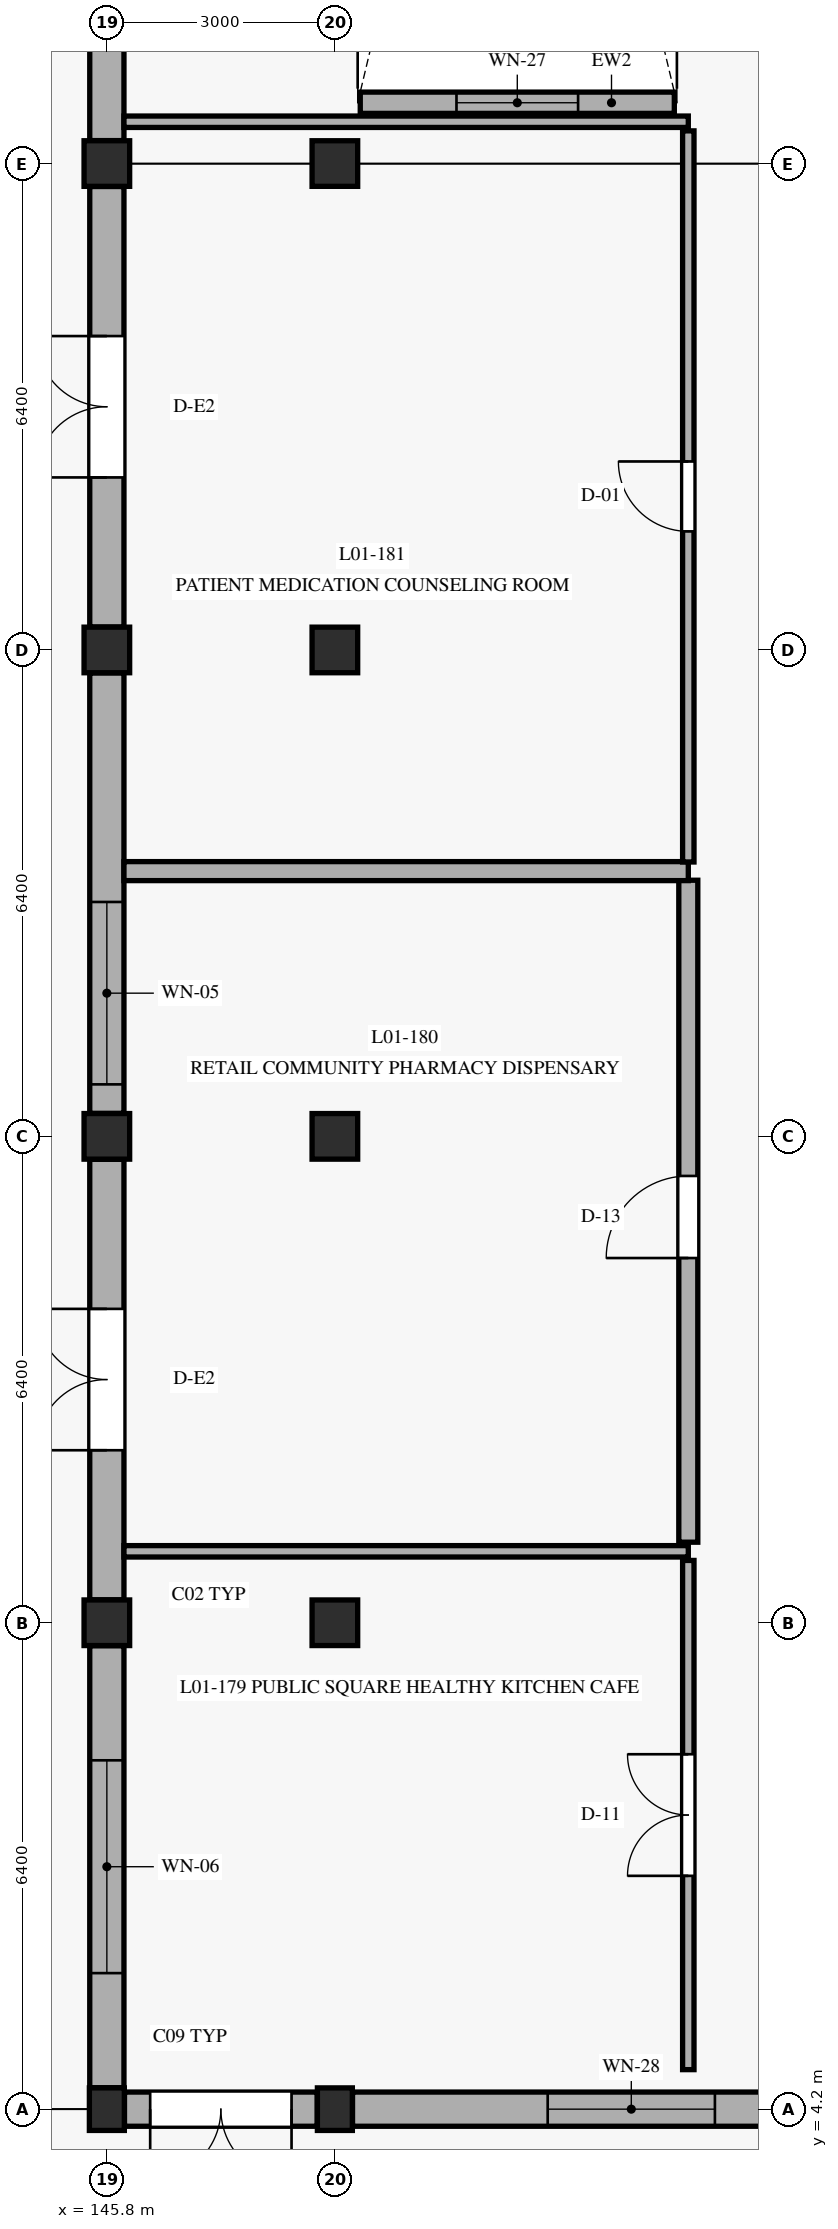
"""IFC4 building model, lengths in metres.
Left out: names, types, materials, properties, quantities, classifications, styles, units other than length and angle.
Written with IfcOpenShell. Run it as: python <this file> out.ifc"""

import sys

from ifc_helpers import new_model, si_unit, direction, frame, frame_2d, origin, origin_with_axes, origin_2d, place, context, subcontext, project, spatial, rectangle, extrude, element, fill, save


model = new_model("IFC4")
c1 = context("Model", 3, precision=1e-05, world=origin(), true_north=direction((0.0, 1.0)))
c2 = subcontext(c1, "Body", "Model", "MODEL_VIEW")
j1 = project(units=[si_unit("LENGTHUNIT", "METRE"), si_unit("PLANEANGLEUNIT", "RADIAN")], contexts=[c1])
p1 = place(None, origin())
s1 = spatial("IfcSite", under=j1, at=p1, CompositionType="ELEMENT")
p2 = place(p1, origin())
s2 = spatial("IfcBuilding", under=s1, at=p2, CompositionType="ELEMENT")
p3 = place(p2, origin())
s3 = spatial("IfcBuildingStorey", under=s2, at=p3, CompositionType="ELEMENT", Elevation=0.0)
p4 = place(p3, frame((145.8, 4.2, 0.0), z_axis=(0.0, 0.0, 1.0), x_axis=(1.0, 0.0, 0.0)))
e1 = element("IfcColumn", 1, at=p4, inside=s3, PredefinedType="COLUMN", context=c2, shape_type="SweptSolid", body=[
    extrude(rectangle(XDim=0.46, YDim=0.56, at=origin_2d()), origin(), (0.0, 0.0, 1.0), 4.8),
])
for number, where, z_axis, x_axis in (
    (2, (145.8, 10.6, 0.0), (0.0, 0.0, 1.0), (1.0, 0.0, 0.0)),
    (3, (145.8, 17.0, 0.0), (0.0, 0.0, 1.0), (1.0, 0.0, 0.0)),
    (4, (145.8, 23.4, 0.0), (0.0, 0.0, 1.0), (1.0, 0.0, 0.0)),
    (5, (145.8, 29.8, 0.0), (0.0, 0.0, 1.0), (1.0, 0.0, 0.0)),
):
    element("IfcColumn", number, at=place(p3, frame(where, z_axis=z_axis, x_axis=x_axis)), inside=s3, PredefinedType="COLUMN", context=c2, shape_type="SweptSolid", body=[
        extrude(rectangle(XDim=0.6, YDim=0.6, at=origin_2d()), origin(), (0.0, 0.0, 1.0), 4.8),
    ])
p5 = place(p3, frame((148.8, 4.2, 0.0), z_axis=(0.0, 0.0, 1.0), x_axis=(1.0, 0.0, 0.0)))
e6 = element("IfcColumn", 6, at=p5, inside=s3, PredefinedType="COLUMN", context=c2, shape_type="SweptSolid", body=[
    extrude(rectangle(XDim=0.46, YDim=0.56, at=origin_2d()), origin(), (0.0, 0.0, 1.0), 4.8),
])
for number, where, z_axis, x_axis in (
    (7, (148.8, 10.6, 0.0), (0.0, 0.0, 1.0), (1.0, 0.0, 0.0)),
    (8, (148.8, 17.0, 0.0), (0.0, 0.0, 1.0), (1.0, 0.0, 0.0)),
    (9, (148.8, 23.4, 0.0), (0.0, 0.0, 1.0), (1.0, 0.0, 0.0)),
    (10, (148.8, 29.8, 0.0), (0.0, 0.0, 1.0), (1.0, 0.0, 0.0)),
):
    element("IfcColumn", number, at=place(p3, frame(where, z_axis=z_axis, x_axis=x_axis)), inside=s3, PredefinedType="COLUMN", context=c2, shape_type="SweptSolid", body=[
        extrude(rectangle(XDim=0.6, YDim=0.6, at=origin_2d()), origin(), (0.0, 0.0, 1.0), 4.8),
    ])
p6 = place(p3, frame((145.8, 10.298, 0.0), z_axis=(0.0, 0.0, 1.0), x_axis=(0.0, -1.0, 0.0)))
e11 = element("IfcWall", 11, at=p6, inside=s3, PredefinedType="SOLIDWALL", context=c2, shape_type="SweptSolid", body=[
    extrude(rectangle(XDim=5.816, YDim=0.45, at=frame_2d((2.908, 0.0))), origin(), (0.0, 0.0, 1.0), 4.09),
])
p7 = place(p6, frame((1.508, 0.0, 0.6)))
e12 = element("IfcOpeningElement", 12, at=p7, cuts=e11, PredefinedType="OPENING", context=c2, shape_type="SweptSolid", body=[
    extrude(rectangle(XDim=2.8, YDim=2.5, at=frame_2d((1.4, 1.25))), frame((0.0, 0.235, 0.0), z_axis=(0.0, -1.0, 0.0), x_axis=(1.0, 0.0, 0.0)), (0.0, 0.0, 1.0), 0.47),
])
p8 = place(p3, frame((145.8, 16.698, 0.0), z_axis=(0.0, 0.0, 1.0), x_axis=(0.0, -1.0, 0.0)))
e13 = element("IfcWall", 13, at=p8, inside=s3, PredefinedType="SOLIDWALL", context=c2, shape_type="SweptSolid", body=[
    extrude(rectangle(XDim=5.796, YDim=0.45, at=frame_2d((2.898, 0.0))), origin(), (0.0, 0.0, 1.0), 4.09),
])
p9 = place(p8, frame((1.968, 0.0, 0.0)))
e14 = element("IfcOpeningElement", 14, at=p9, cuts=e13, PredefinedType="OPENING", context=c2, shape_type="SweptSolid", body=[
    extrude(rectangle(XDim=1.86, YDim=2.5, at=frame_2d((0.93, 1.25))), frame((0.0, 0.235, 0.0), z_axis=(0.0, -1.0, 0.0), x_axis=(1.0, 0.0, 0.0)), (0.0, 0.0, 1.0), 0.47),
])
p10 = place(p3, frame((145.8, 23.098, 0.0), z_axis=(0.0, 0.0, 1.0), x_axis=(0.0, -1.0, 0.0)))
e15 = element("IfcWall", 15, at=p10, inside=s3, PredefinedType="SOLIDWALL", context=c2, shape_type="SweptSolid", body=[
    extrude(rectangle(XDim=5.796, YDim=0.45, at=frame_2d((2.898, 0.0))), origin(), (0.0, 0.0, 1.0), 4.09),
])
p11 = place(p10, frame((3.014, 0.0, 0.6)))
e16 = element("IfcOpeningElement", 16, at=p11, cuts=e15, PredefinedType="OPENING", context=c2, shape_type="SweptSolid", body=[
    extrude(rectangle(XDim=2.4, YDim=2.5, at=frame_2d((1.2, 1.25))), frame((0.0, 0.235, 0.0), z_axis=(0.0, -1.0, 0.0), x_axis=(1.0, 0.0, 0.0)), (0.0, 0.0, 1.0), 0.47),
])
p12 = place(p3, frame((145.8, 29.498, 0.0), z_axis=(0.0, 0.0, 1.0), x_axis=(0.0, -1.0, 0.0)))
e17 = element("IfcWall", 17, at=p12, inside=s3, PredefinedType="SOLIDWALL", context=c2, shape_type="SweptSolid", body=[
    extrude(rectangle(XDim=5.796, YDim=0.45, at=frame_2d((2.898, 0.0))), origin(), (0.0, 0.0, 1.0), 4.09),
])
p13 = place(p12, frame((1.968, 0.0, 0.0)))
e18 = element("IfcOpeningElement", 18, at=p13, cuts=e17, PredefinedType="OPENING", context=c2, shape_type="SweptSolid", body=[
    extrude(rectangle(XDim=1.86, YDim=2.5, at=frame_2d((0.93, 1.25))), frame((0.0, 0.235, 0.0), z_axis=(0.0, -1.0, 0.0), x_axis=(1.0, 0.0, 0.0)), (0.0, 0.0, 1.0), 0.47),
])
p14 = place(p3, frame((145.8, 35.898, 0.0), z_axis=(0.0, 0.0, 1.0), x_axis=(0.0, -1.0, 0.0)))
e19 = element("IfcWall", 19, at=p14, inside=s3, PredefinedType="SOLIDWALL", context=c2, shape_type="SweptSolid", body=[
    extrude(rectangle(XDim=5.796, YDim=0.45, at=frame_2d((2.898, 0.0))), origin(), (0.0, 0.0, 1.0), 4.09),
])
p15 = place(p14, frame((1.498, 0.0, 0.6)))
e20 = element("IfcOpeningElement", 20, at=p15, cuts=e19, PredefinedType="OPENING", context=c2, shape_type="SweptSolid", body=[
    extrude(rectangle(XDim=2.8, YDim=2.5, at=frame_2d((1.4, 1.25))), frame((0.0, 0.235, 0.0), z_axis=(0.0, -1.0, 0.0), x_axis=(1.0, 0.0, 0.0)), (0.0, 0.0, 1.0), 0.47),
])
p16 = place(p3, frame((146.032, 4.2, 0.0), z_axis=(0.0, 0.0, 1.0), x_axis=(1.0, 0.0, 0.0)))
e21 = element("IfcWall", 21, at=p16, inside=s3, PredefinedType="SOLIDWALL", context=c2, shape_type="SweptSolid", body=[
    extrude(rectangle(XDim=2.536, YDim=0.45, at=frame_2d((1.268, 0.0))), origin(), (0.0, 0.0, 1.0), 4.0),
])
p17 = place(p16, frame((0.338, 0.0, 0.0)))
e22 = element("IfcOpeningElement", 22, at=p17, cuts=e21, PredefinedType="OPENING", context=c2, shape_type="SweptSolid", body=[
    extrude(rectangle(XDim=1.86, YDim=2.5, at=frame_2d((0.93, 1.25))), frame((0.0, 0.235, 0.0), z_axis=(0.0, -1.0, 0.0), x_axis=(1.0, 0.0, 0.0)), (0.0, 0.0, 1.0), 0.47),
])
p18 = place(p3, frame((149.032, 4.2, 0.0), z_axis=(0.0, 0.0, 1.0), x_axis=(1.0, 0.0, 0.0)))
e23 = element("IfcWall", 23, at=p18, inside=s3, PredefinedType="SOLIDWALL", context=c2, shape_type="SweptSolid", body=[
    extrude(rectangle(XDim=7.336, YDim=0.45, at=frame_2d((3.668, 0.0))), origin(), (0.0, 0.0, 1.0), 4.0),
])
p19 = place(p18, frame((2.568, 0.0, 0.9)))
e24 = element("IfcOpeningElement", 24, at=p19, cuts=e23, PredefinedType="OPENING", context=c2, shape_type="SweptSolid", body=[
    extrude(rectangle(XDim=2.2, YDim=1.1, at=frame_2d((1.1, 0.55))), frame((0.0, 0.235, 0.0), z_axis=(0.0, -1.0, 0.0), x_axis=(1.0, 0.0, 0.0)), (0.0, 0.0, 1.0), 0.47),
])
p20 = place(p3, frame((153.266, 30.6, 0.0), z_axis=(0.0, 0.0, 1.0), x_axis=(-1.0, 0.0, 0.0)))
e25 = element("IfcWall", 25, at=p20, inside=s3, PredefinedType="SOLIDWALL", context=c2, shape_type="SweptSolid", body=[
    extrude(rectangle(XDim=4.132, YDim=0.28, at=frame_2d((2.066, 0.0))), origin(), (0.0, 0.0, 1.0), 4.5),
])
p21 = place(p20, frame((1.266, 0.0, 0.85)))
e26 = element("IfcOpeningElement", 26, at=p21, cuts=e25, PredefinedType="OPENING", context=c2, shape_type="SweptSolid", body=[
    extrude(rectangle(XDim=1.6, YDim=1.8, at=frame_2d((0.8, 0.9))), frame((0.0, 0.15, 0.0), z_axis=(0.0, -1.0, 0.0), x_axis=(1.0, 0.0, 0.0)), (0.0, 0.0, 1.0), 0.3),
])
p22 = place(p3, frame((153.45, 4.72, 0.0), z_axis=(0.0, 0.0, 1.0), x_axis=(0.0, 1.0, 0.0)))
e27 = element("IfcWall", 27, at=p22, inside=s3, PredefinedType="PARTITIONING", context=c2, shape_type="SweptSolid", body=[
    extrude(rectangle(XDim=6.7, YDim=0.15, at=frame_2d((3.35, 0.0))), origin(), (0.0, 0.0, 1.0), 4.095),
])
p23 = place(p22, frame((2.55, 0.0, 0.0)))
e28 = element("IfcOpeningElement", 28, at=p23, cuts=e27, PredefinedType="OPENING", context=c2, shape_type="SweptSolid", body=[
    extrude(rectangle(XDim=1.6, YDim=2.25, at=frame_2d((0.8, 1.125))), frame((0.0, 0.085, 0.0), z_axis=(0.0, -1.0, 0.0), x_axis=(1.0, 0.0, 0.0)), (0.0, 0.0, 1.0), 0.17),
])
p24 = place(p3, frame((146.025, 11.54, 0.0), z_axis=(0.0, 0.0, 1.0), x_axis=(1.0, 0.0, 0.0)))
e29 = element("IfcWall", 29, at=p24, inside=s3, PredefinedType="PARTITIONING", context=c2, shape_type="SweptSolid", body=[
    extrude(rectangle(XDim=7.425, YDim=0.15, at=frame_2d((3.712, 0.0))), origin(), (0.0, 0.0, 1.0), 4.085),
])
p25 = place(p3, frame((153.45, 11.66, 0.0), z_axis=(0.0, 0.0, 1.0), x_axis=(0.0, 1.0, 0.0)))
e30 = element("IfcWall", 30, at=p25, inside=s3, PredefinedType="SOLIDWALL", context=c2, shape_type="SweptSolid", body=[
    extrude(rectangle(XDim=8.71, YDim=0.25, at=frame_2d((4.355, 0.0))), origin(), (0.0, 0.0, 1.0), 4.095),
])
p26 = place(p25, frame((3.739, 0.0, 0.0)))
e31 = element("IfcOpeningElement", 31, at=p26, cuts=e30, PredefinedType="OPENING", context=c2, shape_type="SweptSolid", body=[
    extrude(rectangle(XDim=1.08, YDim=2.2, at=frame_2d((0.54, 1.1))), frame((0.0, 0.135, 0.0), z_axis=(0.0, -1.0, 0.0), x_axis=(1.0, 0.0, 0.0)), (0.0, 0.0, 1.0), 0.27),
])
p27 = place(p3, frame((146.025, 20.49, 0.0), z_axis=(0.0, 0.0, 1.0), x_axis=(1.0, 0.0, 0.0)))
e32 = element("IfcWall", 32, at=p27, inside=s3, PredefinedType="SOLIDWALL", context=c2, shape_type="SweptSolid", body=[
    extrude(rectangle(XDim=7.425, YDim=0.25, at=frame_2d((3.712, 0.0))), origin(), (0.0, 0.0, 1.0), 4.085),
])
p28 = place(p3, frame((153.45, 20.61, 0.0), z_axis=(0.0, 0.0, 1.0), x_axis=(0.0, 1.0, 0.0)))
e33 = element("IfcWall", 33, at=p28, inside=s3, PredefinedType="PARTITIONING", context=c2, shape_type="SweptSolid", body=[
    extrude(rectangle(XDim=9.62, YDim=0.15, at=frame_2d((4.81, 0.0))), origin(), (0.0, 0.0, 1.0), 3.845),
])
p29 = place(p28, frame((4.35, 0.0, 0.0)))
e34 = element("IfcOpeningElement", 34, at=p29, cuts=e33, PredefinedType="OPENING", context=c2, shape_type="SweptSolid", body=[
    extrude(rectangle(XDim=0.92, YDim=2.15, at=frame_2d((0.46, 1.075))), frame((0.0, 0.085, 0.0), z_axis=(0.0, -1.0, 0.0), x_axis=(1.0, 0.0, 0.0)), (0.0, 0.0, 1.0), 0.17),
])
p30 = place(p3, frame((146.025, 30.35, 0.0), z_axis=(0.0, 0.0, 1.0), x_axis=(1.0, 0.0, 0.0)))
e35 = element("IfcWall", 35, at=p30, inside=s3, PredefinedType="PARTITIONING", context=c2, shape_type="SweptSolid", body=[
    extrude(rectangle(XDim=7.425, YDim=0.15, at=frame_2d((3.712, 0.0))), origin(), (0.0, 0.0, 1.0), 4.085),
])
p31 = place(p7, origin_with_axes())
e36 = element("IfcWindow", 36, at=p31, inside=s3, PartitioningType="SINGLE_PANEL", PredefinedType="WINDOW", context=c2, shape_type="SweptSolid", body=[
    extrude(rectangle(XDim=2.8, YDim=2.5, at=frame_2d((1.4, 1.25))), frame((0.0, 0.03, 0.0), z_axis=(0.0, -1.0, 0.0), x_axis=(1.0, 0.0, 0.0)), (0.0, 0.0, 1.0), 0.06),
])
fill(e12, e36)
p32 = place(p9, frame((1.86, 0.0, 0.0), z_axis=(0.0, 0.0, 1.0), x_axis=(-1.0, 0.0, 0.0)))
e37 = element("IfcDoor", 37, at=p32, inside=s3, OperationType="DOUBLE_DOOR_SINGLE_SWING", PredefinedType="DOOR", context=c2, shape_type="SweptSolid", body=[
    extrude(rectangle(XDim=1.86, YDim=2.5, at=frame_2d((0.93, 1.25))), frame((0.0, 0.025, 0.0), z_axis=(0.0, -1.0, 0.0), x_axis=(1.0, 0.0, 0.0)), (0.0, 0.0, 1.0), 0.05),
])
fill(e14, e37)
p33 = place(p11, origin_with_axes())
e38 = element("IfcWindow", 38, at=p33, inside=s3, PartitioningType="SINGLE_PANEL", PredefinedType="WINDOW", context=c2, shape_type="SweptSolid", body=[
    extrude(rectangle(XDim=2.4, YDim=2.5, at=frame_2d((1.2, 1.25))), frame((0.0, 0.03, 0.0), z_axis=(0.0, -1.0, 0.0), x_axis=(1.0, 0.0, 0.0)), (0.0, 0.0, 1.0), 0.06),
])
fill(e16, e38)
p34 = place(p13, frame((1.86, 0.0, 0.0), z_axis=(0.0, 0.0, 1.0), x_axis=(-1.0, 0.0, 0.0)))
e39 = element("IfcDoor", 39, at=p34, inside=s3, OperationType="DOUBLE_DOOR_SINGLE_SWING", PredefinedType="DOOR", context=c2, shape_type="SweptSolid", body=[
    extrude(rectangle(XDim=1.86, YDim=2.5, at=frame_2d((0.93, 1.25))), frame((0.0, 0.025, 0.0), z_axis=(0.0, -1.0, 0.0), x_axis=(1.0, 0.0, 0.0)), (0.0, 0.0, 1.0), 0.05),
])
fill(e18, e39)
p35 = place(p17, frame((1.86, 0.0, 0.0), z_axis=(0.0, 0.0, 1.0), x_axis=(-1.0, 0.0, 0.0)))
e40 = element("IfcDoor", 40, at=p35, inside=s3, OperationType="DOUBLE_DOOR_SINGLE_SWING", PredefinedType="DOOR", context=c2, shape_type="SweptSolid", body=[
    extrude(rectangle(XDim=1.86, YDim=2.5, at=frame_2d((0.93, 1.25))), frame((0.0, 0.025, 0.0), z_axis=(0.0, -1.0, 0.0), x_axis=(1.0, 0.0, 0.0)), (0.0, 0.0, 1.0), 0.05),
])
fill(e22, e40)
p36 = place(p19, origin_with_axes())
e41 = element("IfcWindow", 41, at=p36, inside=s3, PartitioningType="SINGLE_PANEL", PredefinedType="WINDOW", context=c2, shape_type="SweptSolid", body=[
    extrude(rectangle(XDim=2.2, YDim=1.1, at=frame_2d((1.1, 0.55))), frame((0.0, 0.03, 0.0), z_axis=(0.0, -1.0, 0.0), x_axis=(1.0, 0.0, 0.0)), (0.0, 0.0, 1.0), 0.06),
])
fill(e24, e41)
p37 = place(p21, origin_with_axes())
e42 = element("IfcWindow", 42, at=p37, inside=s3, PartitioningType="SINGLE_PANEL", PredefinedType="WINDOW", context=c2, shape_type="SweptSolid", body=[
    extrude(rectangle(XDim=1.6, YDim=1.8, at=frame_2d((0.8, 0.9))), frame((0.0, 0.03, 0.0), z_axis=(0.0, -1.0, 0.0), x_axis=(1.0, 0.0, 0.0)), (0.0, 0.0, 1.0), 0.06),
])
fill(e26, e42)
p38 = place(p23, origin_with_axes())
e43 = element("IfcDoor", 43, at=p38, inside=s3, OperationType="DOUBLE_DOOR_SINGLE_SWING", PredefinedType="DOOR", context=c2, shape_type="SweptSolid", body=[
    extrude(rectangle(XDim=1.6, YDim=2.25, at=frame_2d((0.8, 1.125))), frame((0.0, 0.025, 0.0), z_axis=(0.0, -1.0, 0.0), x_axis=(1.0, 0.0, 0.0)), (0.0, 0.0, 1.0), 0.05),
])
fill(e28, e43)
p39 = place(p26, origin_with_axes())
e44 = element("IfcDoor", 44, at=p39, inside=s3, OperationType="SINGLE_SWING_LEFT", PredefinedType="DOOR", context=c2, shape_type="SweptSolid", body=[
    extrude(rectangle(XDim=1.08, YDim=2.2, at=frame_2d((0.54, 1.1))), frame((0.0, 0.025, 0.0), z_axis=(0.0, -1.0, 0.0), x_axis=(1.0, 0.0, 0.0)), (0.0, 0.0, 1.0), 0.05),
])
fill(e31, e44)
p40 = place(p29, origin_with_axes())
e45 = element("IfcDoor", 45, at=p40, inside=s3, OperationType="SINGLE_SWING_RIGHT", PredefinedType="DOOR", context=c2, shape_type="SweptSolid", body=[
    extrude(rectangle(XDim=0.92, YDim=2.15, at=frame_2d((0.46, 1.075))), frame((0.0, 0.025, 0.0), z_axis=(0.0, -1.0, 0.0), x_axis=(1.0, 0.0, 0.0)), (0.0, 0.0, 1.0), 0.05),
])
fill(e34, e45)
save(model, sys.argv[1])
